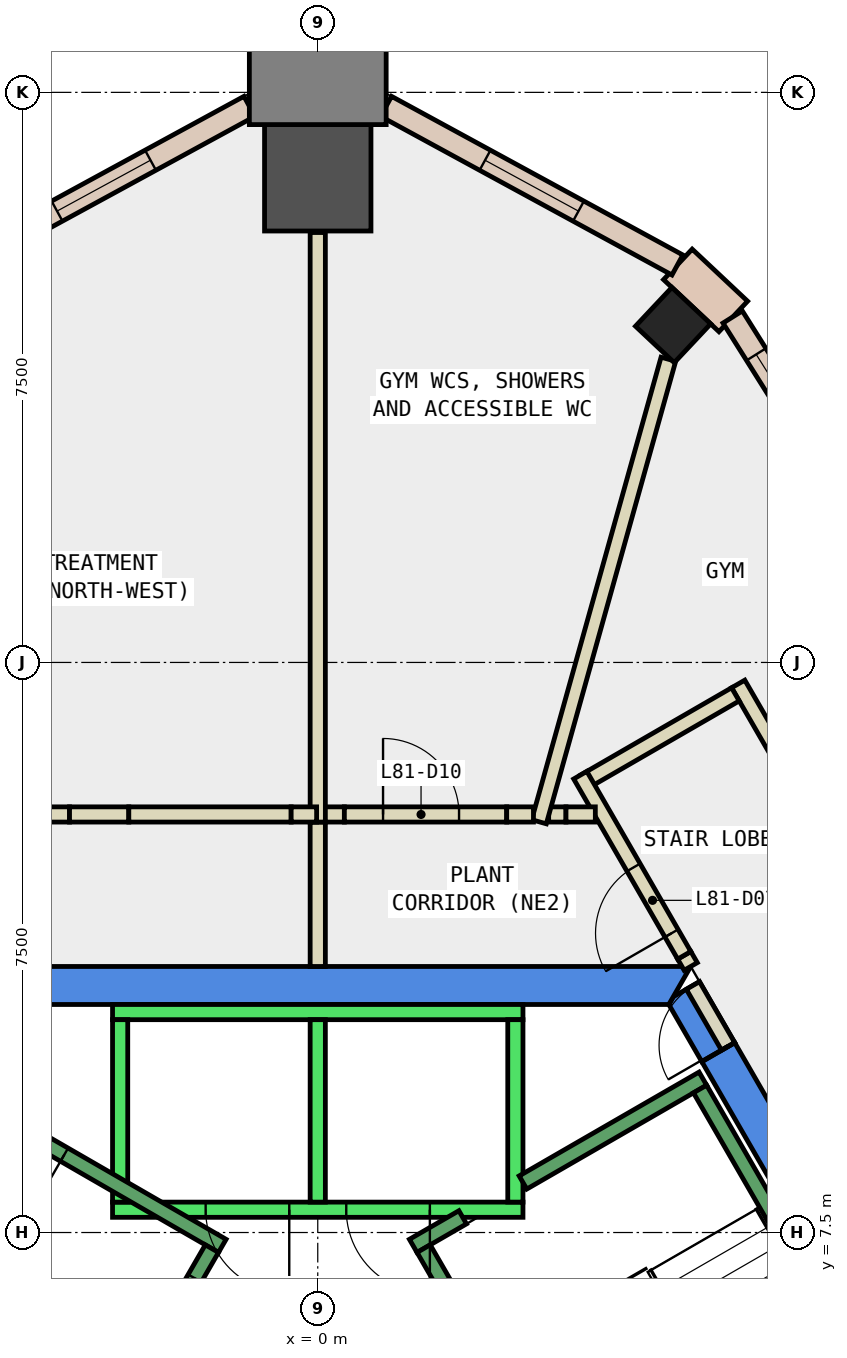
"""IFC4 building model, lengths in metres.
Left out: names, types, materials, properties, quantities, classifications, styles, units other than length and angle.
Written with IfcOpenShell. Run it as: python <this file> out.ifc"""

import sys

from ifc_helpers import new_model, si_unit, direction, frame, frame_2d, origin, origin_2d, place, context, subcontext, project, spatial, polyline, rectangle, outline, extrude, element, fill, save


model = new_model("IFC4")
c1 = context("Model", 3, precision=1e-05, world=origin(), true_north=direction((0.0, 1.0)))
c2 = subcontext(c1, "Body", "Model", "MODEL_VIEW")
j1 = project(units=[si_unit("LENGTHUNIT", "METRE"), si_unit("PLANEANGLEUNIT", "RADIAN")], contexts=[c1])
p1 = place(None, origin())
s1 = spatial("IfcSite", under=j1, at=p1, CompositionType="ELEMENT")
p2 = place(p1, origin())
s2 = spatial("IfcBuilding", under=s1, at=p2, CompositionType="ELEMENT")
p3 = place(p2, frame((0.0, 0.0, 344.9)))
s3 = spatial("IfcBuildingStorey", under=s2, at=p3, CompositionType="ELEMENT", Elevation=344.9)
p4 = place(p3, frame((4.675, 19.439, -0.35), z_axis=(0.0, 0.0, 1.0), x_axis=(-0.728908886641, 0.684610717836, 0.0)))
e1 = element("IfcColumn", 1, at=p4, inside=s3, PredefinedType="COLUMN", context=c2, shape_type="SweptSolid", body=[
    extrude(rectangle(XDim=0.7, YDim=0.7, at=origin_2d()), origin(), (0.0, 0.0, 1.0), 4.4),
])
p5 = place(p3, frame((0.0, 21.376, -0.35), z_axis=(0.0, 0.0, 1.0), x_axis=(0.0, 1.0, 0.0)))
e2 = element("IfcColumn", 2, at=p5, inside=s3, PredefinedType="COLUMN", context=c2, shape_type="SweptSolid", body=[
    extrude(rectangle(XDim=1.4, YDim=1.4, at=origin_2d()), origin(), (0.0, 0.0, 1.0), 4.4),
])
p6 = place(p3, frame((0.0, 22.976, -0.35), z_axis=(0.0, 0.0, 1.0), x_axis=(0.0, 1.0, 0.0)))
e3 = element("IfcColumn", 3, at=p6, inside=s3, PredefinedType="COLUMN", context=c2, shape_type="SweptSolid", body=[
    extrude(rectangle(XDim=1.8, YDim=1.8, at=origin_2d()), origin(), (0.0, 0.0, 1.0), 4.4),
])
p7 = place(p3, frame((0.0, 0.0, -0.35)))
e4 = element("IfcWall", 4, at=p7, inside=s3, PredefinedType="SHEAR", context=c2, shape_type="SweptSolid", body=[
    extrude(outline(polyline([(5.486, 9.998), (5.053, 9.748), (9.238, 2.5), (9.815, 2.5), (5.486, 9.998)])), origin(), (0.0, 0.0, 1.0), 4.4),
])
p8 = place(p3, frame((0.0, 0.0, 3.6)))
e5 = element("IfcWall", 5, at=p8, inside=s3, PredefinedType="SHEAR", context=c2, shape_type="SweptSolid", body=[
    extrude(outline(polyline([(5.022, 10.8), (4.677, 10.601), (4.619, 10.5), (5.053, 9.748), (5.486, 9.998), (5.022, 10.8)])), origin(), (0.0, 0.0, 1.0), 0.45),
])
p9 = place(p3, frame((0.0, 0.0, -0.35)))
e6 = element("IfcWall", 6, at=p9, inside=s3, PredefinedType="SHEAR", context=c2, shape_type="SweptSolid", body=[
    extrude(outline(polyline([(4.907, 11.0), (-4.907, 11.0), (-4.619, 10.5), (4.619, 10.5), (4.907, 11.0)])), origin(), (0.0, 0.0, 1.0), 4.4),
])
p10 = place(p3, frame((5.467, 19.552, 0.0), z_axis=(0.0, 0.0, 1.0), x_axis=(-0.728729965402, 0.684801166416, 0.0)))
e7 = element("IfcWall", 7, at=p10, inside=s3, PredefinedType="STANDARD", context=c2, shape_type="SweptSolid", body=[
    extrude(rectangle(XDim=1.0, YDim=0.55, at=frame_2d((0.5, 0.0))), origin(), (0.0, 0.0, 1.0), 4.05),
])
p11 = place(p3, frame((8.826, 14.19, 0.0), z_axis=(0.0, 0.0, 1.0), x_axis=(-0.532279831475, 0.846568473902, 0.0)))
e8 = element("IfcWall", 8, at=p11, inside=s3, PredefinedType="STANDARD", context=c2, shape_type="SweptSolid", body=[
    extrude(rectangle(XDim=6.325, YDim=0.3, at=frame_2d((3.163, 0.0))), origin(), (0.0, 0.0, 1.0), 4.05),
])
p12 = place(p11, frame((0.581, 0.0, 0.9)))
e9 = element("IfcOpeningElement", 9, at=p12, cuts=e8, PredefinedType="OPENING", context=c2, shape_type="SweptSolid", body=[
    extrude(rectangle(XDim=2.0, YDim=3.0, at=frame_2d((1.0, 1.5))), frame((0.0, 0.16, 0.0), z_axis=(0.0, -1.0, 0.0), x_axis=(1.0, 0.0, 0.0)), (0.0, 0.0, 1.0), 0.32),
])
p13 = place(p11, frame((3.744, 0.0, 0.9)))
e10 = element("IfcOpeningElement", 10, at=p13, cuts=e8, PredefinedType="OPENING", context=c2, shape_type="SweptSolid", body=[
    extrude(rectangle(XDim=2.0, YDim=3.0, at=frame_2d((1.0, 1.5))), frame((0.0, 0.16, 0.0), z_axis=(0.0, -1.0, 0.0), x_axis=(1.0, 0.0, 0.0)), (0.0, 0.0, 1.0), 0.32),
])
p14 = place(p3, frame((4.732, 20.229, 0.0), z_axis=(0.0, 0.0, 1.0), x_axis=(-0.8782630237, 0.478177855197, 0.0)))
e11 = element("IfcWall", 11, at=p14, inside=s3, PredefinedType="STANDARD", context=c2, shape_type="SweptSolid", body=[
    extrude(rectangle(XDim=4.364, YDim=0.3, at=frame_2d((2.182, 0.0))), origin(), (0.0, 0.0, 1.0), 4.05),
])
p15 = place(p14, frame((1.482, 0.0, 0.9)))
e12 = element("IfcOpeningElement", 12, at=p15, cuts=e11, PredefinedType="OPENING", context=c2, shape_type="SweptSolid", body=[
    extrude(rectangle(XDim=1.4, YDim=3.0, at=frame_2d((0.7, 1.5))), frame((0.0, 0.16, 0.0), z_axis=(0.0, -1.0, 0.0), x_axis=(1.0, 0.0, 0.0)), (0.0, 0.0, 1.0), 0.32),
])
p16 = place(p3, frame((-0.899, 22.316, 0.0), z_axis=(0.0, 0.0, 1.0), x_axis=(-0.8782630237, -0.478177855197, 0.0)))
e13 = element("IfcWall", 13, at=p16, inside=s3, PredefinedType="STANDARD", context=c2, shape_type="SweptSolid", body=[
    extrude(rectangle(XDim=4.364, YDim=0.3, at=frame_2d((2.182, 0.0))), origin(), (0.0, 0.0, 1.0), 4.05),
])
p17 = place(p16, frame((1.482, 0.0, 0.9)))
e14 = element("IfcOpeningElement", 14, at=p17, cuts=e13, PredefinedType="OPENING", context=c2, shape_type="SweptSolid", body=[
    extrude(rectangle(XDim=1.4, YDim=3.0, at=frame_2d((0.7, 1.5))), frame((0.0, 0.16, 0.0), z_axis=(0.0, -1.0, 0.0), x_axis=(1.0, 0.0, 0.0)), (0.0, 0.0, 1.0), 0.32),
])
p18 = place(p3, frame((4.907, 11.0, 0.0), z_axis=(0.0, 0.0, 1.0), x_axis=(-0.5004692653, 0.865754303766, 0.0)))
e15 = element("IfcWall", 15, at=p18, inside=s3, PredefinedType="PARTITIONING", context=c2, shape_type="SweptSolid", body=[
    extrude(rectangle(XDim=0.17, YDim=0.2, at=frame_2d((0.085, 0.0))), origin(), (0.0, 0.0, 1.0), 2.4),
])
p19 = place(p3, frame((5.532, 14.717, 0.0), z_axis=(0.0, 0.0, 1.0), x_axis=(0.500119776898, -0.865956239515, 0.0)))
e16 = element("IfcWall", 16, at=p19, inside=s3, PredefinedType="PARTITIONING", context=c2, shape_type="SweptSolid", body=[
    extrude(rectangle(XDim=3.067, YDim=0.2, at=frame_2d((1.534, 0.0))), origin(), (0.0, 0.0, 1.0), 4.05),
])
p20 = place(p3, frame((3.504, 13.43, 0.0), z_axis=(0.0, 0.0, 1.0), x_axis=(0.865927408828, 0.500169693844, 0.0)))
e17 = element("IfcWall", 17, at=p20, inside=s3, PredefinedType="PARTITIONING", context=c2, shape_type="SweptSolid", body=[
    extrude(rectangle(XDim=2.3, YDim=0.2, at=frame_2d((1.15, 0.0))), origin(), (0.0, 0.0, 1.0), 4.05),
])
p21 = place(p3, frame((3.038, 13.0, 0.0), z_axis=(0.0, 0.0, 1.0), x_axis=(1.0, 0.0, 0.0)))
e18 = element("IfcWall", 18, at=p21, inside=s3, PredefinedType="PARTITIONING", context=c2, shape_type="SweptSolid", body=[
    extrude(rectangle(XDim=0.228, YDim=0.2, at=frame_2d((0.114, 0.0))), origin(), (0.0, 0.0, 1.0), 1.95),
])
p22 = place(p3, frame((0.015, 13.0, 0.0), z_axis=(0.0, 0.0, 1.0), x_axis=(1.0, 0.0, 0.0)))
e19 = element("IfcWall", 19, at=p22, inside=s3, PredefinedType="PARTITIONING", context=c2, shape_type="SweptSolid", body=[
    extrude(rectangle(XDim=0.335, YDim=0.2, at=frame_2d((0.167, 0.0))), origin(), (0.0, 0.0, 1.0), 1.95),
])
p23 = place(p3, frame((0.0, 11.0, 0.0), z_axis=(0.0, 0.0, 1.0), x_axis=(0.0, 1.0, 0.0)))
e20 = element("IfcWall", 20, at=p23, inside=s3, PredefinedType="PARTITIONING", context=c2, shape_type="SweptSolid", body=[
    extrude(rectangle(XDim=1.9, YDim=0.2, at=frame_2d((0.95, 0.0))), origin(), (0.0, 0.0, 1.0), 1.95),
])
p24 = place(p3, frame((2.911, 12.904, 0.0), z_axis=(0.0, 0.0, 1.0), x_axis=(0.269389141698, 0.963031406723, 0.0)))
e21 = element("IfcWall", 21, at=p24, inside=s3, PredefinedType="PARTITIONING", context=c2, shape_type="SweptSolid", body=[
    extrude(rectangle(XDim=6.319, YDim=0.2, at=frame_2d((3.159, 0.0))), origin(), (0.0, 0.0, 1.0), 1.95),
])
p25 = place(p3, frame((0.0, 12.9, 0.0), z_axis=(0.0, 0.0, 1.0), x_axis=(0.0, 1.0, 0.0)))
e22 = element("IfcWall", 22, at=p25, inside=s3, PredefinedType="PARTITIONING", context=c2, shape_type="SweptSolid", body=[
    extrude(rectangle(XDim=7.756, YDim=0.2, at=frame_2d((3.878, 0.0))), origin(), (0.0, 0.0, 1.0), 1.95),
])
p26 = place(p3, frame((-5.962, 13.0, 0.0), z_axis=(0.0, 0.0, 1.0), x_axis=(1.0, 0.0, 0.0)))
e23 = element("IfcWall", 23, at=p26, inside=s3, PredefinedType="PARTITIONING", context=c2, shape_type="SweptSolid", body=[
    extrude(rectangle(XDim=2.696, YDim=0.2, at=frame_2d((1.348, 0.0))), origin(), (0.0, 0.0, 1.0), 4.05),
])
p27 = place(p3, frame((5.399, 9.948, 0.0), z_axis=(0.0, 0.0, 1.0), x_axis=(-0.499882215713, 0.866093395895, 0.0)))
e24 = element("IfcWall", 24, at=p27, inside=s3, PredefinedType="PARTITIONING", context=c2, shape_type="SweptSolid", body=[
    extrude(rectangle(XDim=0.926, YDim=0.2, at=frame_2d((0.463, 0.0))), origin(), (0.0, 0.0, 1.0), 2.4),
])
p28 = place(p27, frame((0.017, 0.0, 0.0)))
e25 = element("IfcOpeningElement", 25, at=p28, cuts=e24, PredefinedType="OPENING", context=c2, shape_type="SweptSolid", body=[
    extrude(rectangle(XDim=0.9, YDim=2.1, at=frame_2d((0.45, 1.05))), frame((0.0, 0.11, 0.0), z_axis=(0.0, -1.0, 0.0), x_axis=(1.0, 0.0, 0.0)), (0.0, 0.0, 1.0), 0.22),
])
p29 = place(p3, frame((4.822, 11.147, 0.0), z_axis=(0.0, 0.0, 1.0), x_axis=(-0.499871764879, 0.866099427708, 0.0)))
e26 = element("IfcWall", 26, at=p29, inside=s3, PredefinedType="PARTITIONING", context=c2, shape_type="SweptSolid", body=[
    extrude(rectangle(XDim=2.737, YDim=0.2, at=frame_2d((1.368, 0.0))), origin(), (0.0, 0.0, 1.0), 4.05),
])
p30 = place(p29, frame((0.335, 0.0, 0.0)))
e27 = element("IfcOpeningElement", 27, at=p30, cuts=e26, PredefinedType="OPENING", context=c2, shape_type="SweptSolid", body=[
    extrude(rectangle(XDim=1.0, YDim=2.1, at=frame_2d((0.5, 1.05))), frame((0.0, 0.11, 0.0), z_axis=(0.0, -1.0, 0.0), x_axis=(1.0, 0.0, 0.0)), (0.0, 0.0, 1.0), 0.22),
])
p31 = place(p3, frame((3.266, 13.0, 0.0), z_axis=(0.0, 0.0, 1.0), x_axis=(1.0, 0.0, 0.0)))
e28 = element("IfcWall", 28, at=p31, inside=s3, PredefinedType="PARTITIONING", context=c2, shape_type="SweptSolid", body=[
    extrude(rectangle(XDim=0.386, YDim=0.2, at=frame_2d((0.193, 0.0))), origin(), (0.0, 0.0, 1.0), 4.05),
])
p32 = place(p3, frame((0.35, 13.0, 0.0), z_axis=(0.0, 0.0, 1.0), x_axis=(1.0, 0.0, 0.0)))
e29 = element("IfcWall", 29, at=p32, inside=s3, PredefinedType="PARTITIONING", context=c2, shape_type="SweptSolid", body=[
    extrude(rectangle(XDim=2.136, YDim=0.2, at=frame_2d((1.068, 0.0))), origin(), (0.0, 0.0, 1.0), 4.05),
])
p33 = place(p32, frame((0.509, 0.0, 0.0)))
e30 = element("IfcOpeningElement", 30, at=p33, cuts=e29, PredefinedType="OPENING", context=c2, shape_type="SweptSolid", body=[
    extrude(rectangle(XDim=1.0, YDim=2.1, at=frame_2d((0.5, 1.05))), frame((0.0, 0.11, 0.0), z_axis=(0.0, -1.0, 0.0), x_axis=(1.0, 0.0, 0.0)), (0.0, 0.0, 1.0), 0.22),
])
p34 = place(p3, frame((2.486, 13.0, 0.0), z_axis=(0.0, 0.0, 1.0), x_axis=(1.0, 0.0, 0.0)))
e31 = element("IfcWall", 31, at=p34, inside=s3, PredefinedType="PARTITIONING", context=c2, shape_type="SweptSolid", body=[
    extrude(rectangle(XDim=0.352, YDim=0.2, at=frame_2d((0.176, 0.0))), origin(), (0.0, 0.0, 1.0), 1.95),
])
p35 = place(p3, frame((-3.266, 13.0, 0.0), z_axis=(0.0, 0.0, 1.0), x_axis=(1.0, 0.0, 0.0)))
e32 = element("IfcWall", 32, at=p35, inside=s3, PredefinedType="PARTITIONING", context=c2, shape_type="SweptSolid", body=[
    extrude(rectangle(XDim=0.78, YDim=0.2, at=frame_2d((0.39, 0.0))), origin(), (0.0, 0.0, 1.0), 1.95),
])
p36 = place(p3, frame((-2.486, 13.0, 0.0), z_axis=(0.0, 0.0, 1.0), x_axis=(1.0, 0.0, 0.0)))
e33 = element("IfcWall", 33, at=p36, inside=s3, PredefinedType="PARTITIONING", context=c2, shape_type="SweptSolid", body=[
    extrude(rectangle(XDim=2.136, YDim=0.2, at=frame_2d((1.068, 0.0))), origin(), (0.0, 0.0, 1.0), 4.05),
])
p37 = place(p3, frame((-0.35, 13.0, 0.0), z_axis=(0.0, 0.0, 1.0), x_axis=(1.0, 0.0, 0.0)))
e34 = element("IfcWall", 34, at=p37, inside=s3, PredefinedType="PARTITIONING", context=c2, shape_type="SweptSolid", body=[
    extrude(rectangle(XDim=0.335, YDim=0.2, at=frame_2d((0.167, 0.0))), origin(), (0.0, 0.0, 1.0), 1.95),
])
p38 = place(p3, frame((2.7, 7.8, 0.0), z_axis=(0.0, 0.0, 1.0), x_axis=(-1.0, 0.0, 0.0)))
e35 = element("IfcWall", 35, at=p38, inside=s3, PredefinedType="STANDARD", context=c2, shape_type="SweptSolid", body=[
    extrude(rectangle(XDim=5.4, YDim=0.2, at=frame_2d((2.7, 0.0))), origin(), (0.0, 0.0, 1.0), 4.05),
])
p39 = place(p38, frame((1.225, 0.0, 0.0)))
e36 = element("IfcOpeningElement", 36, at=p39, cuts=e35, PredefinedType="OPENING", context=c2, shape_type="SweptSolid", body=[
    extrude(rectangle(XDim=1.1, YDim=2.1, at=frame_2d((0.55, 1.05))), frame((0.0, 0.11, 0.0), z_axis=(0.0, -1.0, 0.0), x_axis=(1.0, 0.0, 0.0)), (0.0, 0.0, 1.0), 0.22),
])
p40 = place(p38, frame((3.075, 0.0, 0.0)))
e37 = element("IfcOpeningElement", 37, at=p40, cuts=e35, PredefinedType="OPENING", context=c2, shape_type="SweptSolid", body=[
    extrude(rectangle(XDim=1.1, YDim=2.1, at=frame_2d((0.55, 1.05))), frame((0.0, 0.11, 0.0), z_axis=(0.0, -1.0, 0.0), x_axis=(1.0, 0.0, 0.0)), (0.0, 0.0, 1.0), 0.22),
])
p41 = place(p3, frame((2.7, 10.4, 0.0), z_axis=(0.0, 0.0, 1.0), x_axis=(-1.0, 0.0, 0.0)))
e38 = element("IfcWall", 38, at=p41, inside=s3, PredefinedType="STANDARD", context=c2, shape_type="SweptSolid", body=[
    extrude(rectangle(XDim=5.4, YDim=0.2, at=frame_2d((2.7, 0.0))), origin(), (0.0, 0.0, 1.0), 4.05),
])
for number, where, z_axis, x_axis in (
    (39, (2.6, 7.9, 0.0), (0.0, 0.0, 1.0), (0.0, 1.0, 0.0)),
    (40, (0.0, 7.9, 0.0), (0.0, 0.0, 1.0), (0.0, 1.0, 0.0)),
    (41, (-2.6, 7.9, 0.0), (0.0, 0.0, 1.0), (0.0, 1.0, 0.0)),
):
    element("IfcWall", number, at=place(p3, frame(where, z_axis=z_axis, x_axis=x_axis)), inside=s3, PredefinedType="STANDARD", context=c2, shape_type="SweptSolid", body=[
        extrude(rectangle(XDim=2.4, YDim=0.2, at=frame_2d((1.2, 0.0))), origin(), (0.0, 0.0, 1.0), 4.05),
    ])
p42 = place(p3, frame((2.7, 8.158, 0.0), z_axis=(0.0, 0.0, 1.0), x_axis=(0.86611865017, 0.499838457731, 0.0)))
e42 = element("IfcWall", 42, at=p42, inside=s3, PredefinedType="STANDARD", context=c2, shape_type="SweptSolid", body=[
    extrude(rectangle(XDim=2.733, YDim=0.2, at=frame_2d((1.366, 0.0))), origin(), (0.0, 0.0, 1.0), 4.05),
])
p43 = place(p3, frame((1.256, 7.324, 0.0), z_axis=(0.0, 0.0, 1.0), x_axis=(0.865915093549, 0.500191014278, 0.0)))
e43 = element("IfcWall", 43, at=p43, inside=s3, PredefinedType="STANDARD", context=c2, shape_type="SweptSolid", body=[
    extrude(rectangle(XDim=0.752, YDim=0.2, at=frame_2d((0.376, 0.0))), origin(), (0.0, 0.0, 1.0), 4.05),
])
p44 = place(p3, frame((4.843, 1.312, 0.0), z_axis=(0.0, 0.0, 1.0), x_axis=(-0.499963383562, 0.866046543262, 0.0)))
e44 = element("IfcWall", 44, at=p44, inside=s3, PredefinedType="STANDARD", context=c2, shape_type="SweptSolid", body=[
    extrude(rectangle(XDim=6.9, YDim=0.2, at=frame_2d((3.45, 0.0))), origin(), (0.0, 0.0, 1.0), 4.05),
])
p45 = place(p44, frame((0.45, 0.0, 0.0)))
e45 = element("IfcOpeningElement", 45, at=p45, cuts=e44, PredefinedType="OPENING", context=c2, shape_type="SweptSolid", body=[
    extrude(rectangle(XDim=1.1, YDim=2.2, at=frame_2d((0.55, 1.1))), frame((0.0, 0.11, 0.0), z_axis=(0.0, -1.0, 0.0), x_axis=(1.0, 0.0, 0.0)), (0.0, 0.0, 1.0), 0.22),
])
p46 = place(p3, frame((8.48, 3.412, 0.0), z_axis=(0.0, 0.0, 1.0), x_axis=(-0.499978703459, 0.866037698999, 0.0)))
e46 = element("IfcWall", 46, at=p46, inside=s3, PredefinedType="STANDARD", context=c2, shape_type="SweptSolid", body=[
    extrude(rectangle(XDim=6.9, YDim=0.2, at=frame_2d((3.45, 0.0))), origin(), (0.0, 0.0, 1.0), 4.05),
])
p47 = place(p3, frame((-1.256, 7.324, 0.0), z_axis=(0.0, 0.0, 1.0), x_axis=(-0.866046073146, 0.499964197906, 0.0)))
e47 = element("IfcWall", 47, at=p47, inside=s3, PredefinedType="STANDARD", context=c2, shape_type="SweptSolid", body=[
    extrude(rectangle(XDim=4.4, YDim=0.2, at=frame_2d((2.2, 0.0))), origin(), (0.0, 0.0, 1.0), 4.05),
])
p48 = place(p47, frame((2.4, 0.0, 0.0)))
e48 = element("IfcOpeningElement", 48, at=p48, cuts=e47, PredefinedType="OPENING", context=c2, shape_type="SweptSolid", body=[
    extrude(rectangle(XDim=1.1, YDim=2.2, at=frame_2d((0.55, 1.1))), frame((0.0, 0.11, 0.0), z_axis=(0.0, -1.0, 0.0), x_axis=(1.0, 0.0, 0.0)), (0.0, 0.0, 1.0), 0.22),
])
p49 = place(p3, frame((-1.393, 7.288, 0.0), z_axis=(0.0, 0.0, 1.0), x_axis=(-0.499963383562, -0.866046543262, 0.0)))
e49 = element("IfcWall", 49, at=p49, inside=s3, PredefinedType="STANDARD", context=c2, shape_type="SweptSolid", body=[
    extrude(rectangle(XDim=6.9, YDim=0.2, at=frame_2d((3.45, 0.0))), origin(), (0.0, 0.0, 1.0), 4.05),
])
p50 = place(p49, frame((0.45, 0.0, 0.0)))
e50 = element("IfcOpeningElement", 50, at=p50, cuts=e49, PredefinedType="OPENING", context=c2, shape_type="SweptSolid", body=[
    extrude(rectangle(XDim=1.1, YDim=2.2, at=frame_2d((0.55, 1.1))), frame((0.0, 0.11, 0.0), z_axis=(0.0, -1.0, 0.0), x_axis=(1.0, 0.0, 0.0)), (0.0, 0.0, 1.0), 0.22),
])
p51 = place(p13, origin())
e51 = element("IfcWindow", 51, at=p51, inside=s3, PartitioningType="SINGLE_PANEL", PredefinedType="WINDOW", context=c2, shape_type="SweptSolid", body=[
    extrude(rectangle(XDim=2.0, YDim=3.0, at=frame_2d((1.0, 1.5))), frame((0.0, 0.03, 0.0), z_axis=(0.0, -1.0, 0.0), x_axis=(1.0, 0.0, 0.0)), (0.0, 0.0, 1.0), 0.06),
])
fill(e10, e51)
p52 = place(p15, origin())
e52 = element("IfcWindow", 52, at=p52, inside=s3, PartitioningType="SINGLE_PANEL", PredefinedType="WINDOW", context=c2, shape_type="SweptSolid", body=[
    extrude(rectangle(XDim=1.4, YDim=3.0, at=frame_2d((0.7, 1.5))), frame((0.0, 0.03, 0.0), z_axis=(0.0, -1.0, 0.0), x_axis=(1.0, 0.0, 0.0)), (0.0, 0.0, 1.0), 0.06),
])
fill(e12, e52)
p53 = place(p17, origin())
e53 = element("IfcWindow", 53, at=p53, inside=s3, PartitioningType="SINGLE_PANEL", PredefinedType="WINDOW", context=c2, shape_type="SweptSolid", body=[
    extrude(rectangle(XDim=1.4, YDim=3.0, at=frame_2d((0.7, 1.5))), frame((0.0, 0.03, 0.0), z_axis=(0.0, -1.0, 0.0), x_axis=(1.0, 0.0, 0.0)), (0.0, 0.0, 1.0), 0.06),
])
fill(e14, e53)
p54 = place(p30, origin())
e54 = element("IfcDoor", 54, at=p54, inside=s3, OperationType="SINGLE_SWING_RIGHT", PredefinedType="DOOR", context=c2, shape_type="SweptSolid", body=[
    extrude(rectangle(XDim=1.0, YDim=2.1, at=frame_2d((0.5, 1.05))), frame((0.0, 0.025, 0.0), z_axis=(0.0, -1.0, 0.0), x_axis=(1.0, 0.0, 0.0)), (0.0, 0.0, 1.0), 0.05),
])
fill(e27, e54)
p55 = place(p33, origin())
e55 = element("IfcDoor", 55, at=p55, inside=s3, OperationType="SINGLE_SWING_LEFT", PredefinedType="DOOR", context=c2, shape_type="SweptSolid", body=[
    extrude(rectangle(XDim=1.0, YDim=2.1, at=frame_2d((0.5, 1.05))), frame((0.0, 0.025, 0.0), z_axis=(0.0, -1.0, 0.0), x_axis=(1.0, 0.0, 0.0)), (0.0, 0.0, 1.0), 0.05),
])
fill(e30, e55)
p56 = place(p28, origin())
e56 = element("IfcDoor", 56, at=p56, inside=s3, OperationType="SINGLE_SWING_LEFT", PredefinedType="DOOR", context=c2, shape_type="SweptSolid", body=[
    extrude(rectangle(XDim=0.9, YDim=2.1, at=frame_2d((0.45, 1.05))), frame((0.0, 0.025, 0.0), z_axis=(0.0, -1.0, 0.0), x_axis=(1.0, 0.0, 0.0)), (0.0, 0.0, 1.0), 0.05),
])
fill(e25, e56)
p57 = place(p39, origin())
e57 = element("IfcDoor", 57, at=p57, inside=s3, OperationType="SLIDING_TO_LEFT", PredefinedType="DOOR", context=c2, shape_type="SweptSolid", body=[
    extrude(rectangle(XDim=1.1, YDim=2.1, at=frame_2d((0.55, 1.05))), frame((0.0, 0.025, 0.0), z_axis=(0.0, -1.0, 0.0), x_axis=(1.0, 0.0, 0.0)), (0.0, 0.0, 1.0), 0.05),
])
fill(e36, e57)
p58 = place(p40, origin())
e58 = element("IfcDoor", 58, at=p58, inside=s3, OperationType="SLIDING_TO_LEFT", PredefinedType="DOOR", context=c2, shape_type="SweptSolid", body=[
    extrude(rectangle(XDim=1.1, YDim=2.1, at=frame_2d((0.55, 1.05))), frame((0.0, 0.025, 0.0), z_axis=(0.0, -1.0, 0.0), x_axis=(1.0, 0.0, 0.0)), (0.0, 0.0, 1.0), 0.05),
])
fill(e37, e58)
p59 = place(p50, origin())
e59 = element("IfcDoor", 59, at=p59, inside=s3, OperationType="SINGLE_SWING_LEFT", PredefinedType="DOOR", context=c2, shape_type="SweptSolid", body=[
    extrude(rectangle(XDim=1.1, YDim=2.2, at=frame_2d((0.55, 1.1))), frame((0.0, 0.025, 0.0), z_axis=(0.0, -1.0, 0.0), x_axis=(1.0, 0.0, 0.0)), (0.0, 0.0, 1.0), 0.05),
])
fill(e50, e59)
p60 = place(p48, origin())
e60 = element("IfcDoor", 60, at=p60, inside=s3, OperationType="SINGLE_SWING_LEFT", PredefinedType="DOOR", context=c2, shape_type="SweptSolid", body=[
    extrude(rectangle(XDim=1.1, YDim=2.2, at=frame_2d((0.55, 1.1))), frame((0.0, 0.025, 0.0), z_axis=(0.0, -1.0, 0.0), x_axis=(1.0, 0.0, 0.0)), (0.0, 0.0, 1.0), 0.05),
])
fill(e48, e60)
save(model, sys.argv[1])
